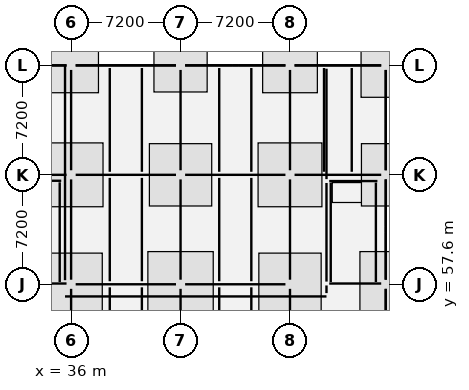
"""IFC4 building model, lengths in metres.
Left out: names, types, materials, properties, quantities, classifications, styles, units other than length and angle.
Written with IfcOpenShell. Run it as: python <this file> out.ifc"""

import sys

from ifc_helpers import new_model, si_unit, direction, frame, frame_2d, origin, origin_2d, place, context, subcontext, project, spatial, rectangle, extrude, element, fill, save


model = new_model("IFC4")
c1 = context("Model", 3, precision=1e-05, world=origin(), true_north=direction((0.0, 1.0)))
c2 = subcontext(c1, "Body", "Model", "MODEL_VIEW")
j1 = project(units=[si_unit("LENGTHUNIT", "METRE"), si_unit("PLANEANGLEUNIT", "RADIAN")], contexts=[c1])
p1 = place(None, origin())
s1 = spatial("IfcSite", under=j1, at=p1, CompositionType="ELEMENT")
p2 = place(p1, origin())
s2 = spatial("IfcBuilding", under=s1, at=p2, CompositionType="ELEMENT")
p3 = place(p2, origin())
s3 = spatial("IfcBuildingStorey", under=s2, at=p3, CompositionType="ELEMENT", Elevation=0.0)
for number, where, z_axis, x_axis in (
    (1, (36.0, 57.6, 0.0), (0.0, 0.0, 1.0), (1.0, 0.0, 0.0)),
    (2, (36.0, 64.8, 0.0), (0.0, 0.0, 1.0), (1.0, 0.0, 0.0)),
    (3, (36.0, 72.0, 0.0), (0.0, 0.0, 1.0), (1.0, 0.0, 0.0)),
    (4, (43.2, 57.6, 0.0), (0.0, 0.0, 1.0), (1.0, 0.0, 0.0)),
    (5, (43.2, 64.8, 0.0), (0.0, 0.0, 1.0), (1.0, 0.0, 0.0)),
    (6, (43.2, 72.0, 0.0), (0.0, 0.0, 1.0), (1.0, 0.0, 0.0)),
    (7, (50.4, 57.6, 0.0), (0.0, 0.0, 1.0), (1.0, 0.0, 0.0)),
    (8, (50.4, 64.8, 0.0), (0.0, 0.0, 1.0), (1.0, 0.0, 0.0)),
    (9, (50.4, 72.0, 0.0), (0.0, 0.0, 1.0), (1.0, 0.0, 0.0)),
    (10, (56.7, 57.6, 0.0), (0.0, 0.0, 1.0), (1.0, 0.0, 0.0)),
    (11, (56.7, 64.8, 0.0), (0.0, 0.0, 1.0), (1.0, 0.0, 0.0)),
    (12, (56.7, 72.0, 0.0), (0.0, 0.0, 1.0), (1.0, 0.0, 0.0)),
):
    element("IfcColumn", number, at=place(p3, frame(where, z_axis=z_axis, x_axis=x_axis)), inside=s3, PredefinedType="COLUMN", context=c2, shape_type="SweptSolid", body=[
        extrude(rectangle(XDim=0.6, YDim=0.6, at=origin_2d()), origin(), (0.0, 0.0, 1.0), 5.4),
    ])
p4 = place(p3, frame((32.16, 57.65, 0.0), z_axis=(0.0, 0.0, 1.0), x_axis=(1.0, 0.0, 0.0)))
e13 = element("IfcWall", 13, at=p4, inside=s3, PredefinedType="SHEAR", context=c2, shape_type="SweptSolid", body=[
    extrude(rectangle(XDim=3.54, YDim=0.2, at=frame_2d((1.77, 0.0))), origin(), (0.0, 0.0, 1.0), 5.15),
])
p5 = place(p4, frame((1.22, 0.0, 0.0)))
e14 = element("IfcOpeningElement", 14, at=p5, cuts=e13, PredefinedType="OPENING", context=c2, shape_type="SweptSolid", body=[
    extrude(rectangle(XDim=1.1, YDim=2.15, at=frame_2d((0.55, 1.075))), frame((0.0, 0.112, 0.0), z_axis=(0.0, -1.0, 0.0), x_axis=(1.0, 0.0, 0.0)), (0.0, 0.0, 1.0), 0.224),
])
p6 = place(p3, frame((32.16, 64.41, 0.0), z_axis=(0.0, 0.0, 1.0), x_axis=(1.0, 0.0, 0.0)))
e15 = element("IfcWall", 15, at=p6, inside=s3, PredefinedType="SHEAR", context=c2, shape_type="SweptSolid", body=[
    extrude(rectangle(XDim=3.19, YDim=0.2, at=frame_2d((1.595, 0.0))), origin(), (0.0, 0.0, 1.0), 5.15),
])
p7 = place(p3, frame((35.25, 57.75, 0.0), z_axis=(0.0, 0.0, 1.0), x_axis=(0.0, 1.0, 0.0)))
e16 = element("IfcWall", 16, at=p7, inside=s3, PredefinedType="SHEAR", context=c2, shape_type="SweptSolid", body=[
    extrude(rectangle(XDim=6.56, YDim=0.2, at=frame_2d((3.28, 0.0))), origin(), (0.0, 0.0, 1.0), 5.15),
])
p8 = place(p3, frame((52.98, 57.65, 0.0), z_axis=(0.0, 0.0, 1.0), x_axis=(1.0, 0.0, 0.0)))
e17 = element("IfcWall", 17, at=p8, inside=s3, PredefinedType="SHEAR", context=c2, shape_type="SweptSolid", body=[
    extrude(rectangle(XDim=3.42, YDim=0.2, at=frame_2d((1.71, 0.0))), origin(), (0.0, 0.0, 1.0), 5.15),
])
p9 = place(p8, frame((1.16, 0.0, 0.0)))
e18 = element("IfcOpeningElement", 18, at=p9, cuts=e17, PredefinedType="OPENING", context=c2, shape_type="SweptSolid", body=[
    extrude(rectangle(XDim=1.1, YDim=2.15, at=frame_2d((0.55, 1.075))), frame((0.0, 0.112, 0.0), z_axis=(0.0, -1.0, 0.0), x_axis=(1.0, 0.0, 0.0)), (0.0, 0.0, 1.0), 0.224),
])
p10 = place(p3, frame((52.98, 64.39, 0.0), z_axis=(0.0, 0.0, 1.0), x_axis=(1.0, 0.0, 0.0)))
e19 = element("IfcWall", 19, at=p10, inside=s3, PredefinedType="SHEAR", context=c2, shape_type="SweptSolid", body=[
    extrude(rectangle(XDim=3.17, YDim=0.2, at=frame_2d((1.585, 0.0))), origin(), (0.0, 0.0, 1.0), 5.15),
])
for number, where, z_axis, x_axis in (
    (20, (53.08, 57.75, 0.0), (0.0, 0.0, 1.0), (0.0, 1.0, 0.0)),
    (21, (56.05, 57.75, 0.0), (0.0, 0.0, 1.0), (0.0, 1.0, 0.0)),
):
    element("IfcWall", number, at=place(p3, frame(where, z_axis=z_axis, x_axis=x_axis)), inside=s3, PredefinedType="SHEAR", context=c2, shape_type="SweptSolid", body=[
        extrude(rectangle(XDim=6.54, YDim=0.2, at=frame_2d((3.27, 0.0))), origin(), (0.0, 0.0, 1.0), 5.15),
    ])
p11 = place(p3, frame((36.3, 72.0, 0.0), z_axis=(0.0, 0.0, 1.0), x_axis=(1.0, 0.0, 0.0)))
e22 = element("IfcWall", 22, at=p11, inside=s3, PredefinedType="ELEMENTEDWALL", context=c2, shape_type="SweptSolid", body=[
    extrude(rectangle(XDim=6.6, YDim=0.32, at=frame_2d((3.3, 0.0))), origin(), (0.0, 0.0, 1.0), 4.49),
])
p12 = place(p11, frame((2.25, 0.0, 0.85)))
e23 = element("IfcOpeningElement", 23, at=p12, cuts=e22, PredefinedType="OPENING", context=c2, shape_type="SweptSolid", body=[
    extrude(rectangle(XDim=2.1, YDim=2.15, at=frame_2d((1.05, 1.075))), frame((0.0, 0.172, 0.0), z_axis=(0.0, -1.0, 0.0), x_axis=(1.0, 0.0, 0.0)), (0.0, 0.0, 1.0), 0.344),
])
p13 = place(p3, frame((46.6, 72.0, 0.0), z_axis=(0.0, 0.0, 1.0), x_axis=(1.0, 0.0, 0.0)))
e24 = element("IfcWall", 24, at=p13, inside=s3, PredefinedType="SOLIDWALL", context=c2, shape_type="SweptSolid", body=[
    extrude(rectangle(XDim=0.4, YDim=0.36, at=frame_2d((0.2, 0.0))), origin(), (0.0, 0.0, 1.0), 4.49),
])
p14 = place(p3, frame((50.7, 72.0, 0.0), z_axis=(0.0, 0.0, 1.0), x_axis=(1.0, 0.0, 0.0)))
e25 = element("IfcWall", 25, at=p14, inside=s3, PredefinedType="ELEMENTEDWALL", context=c2, shape_type="SweptSolid", body=[
    extrude(rectangle(XDim=5.7, YDim=0.32, at=frame_2d((2.85, 0.0))), origin(), (0.0, 0.0, 1.0), 4.49),
])
p15 = place(p3, frame((56.7, 68.6, 0.0), z_axis=(0.0, 0.0, 1.0), x_axis=(0.0, -1.0, 0.0)))
e26 = element("IfcWall", 26, at=p15, inside=s3, PredefinedType="SOLIDWALL", context=c2, shape_type="SweptSolid", body=[
    extrude(rectangle(XDim=0.4, YDim=0.36, at=frame_2d((0.2, 0.0))), origin(), (0.0, 0.0, 1.0), 4.49),
])
p16 = place(p3, frame((56.7, 61.4, 0.0), z_axis=(0.0, 0.0, 1.0), x_axis=(0.0, -1.0, 0.0)))
e27 = element("IfcWall", 27, at=p16, inside=s3, PredefinedType="SOLIDWALL", context=c2, shape_type="SweptSolid", body=[
    extrude(rectangle(XDim=0.4, YDim=0.36, at=frame_2d((0.2, 0.0))), origin(), (0.0, 0.0, 1.0), 4.54),
])
p17 = place(p3, frame((56.7, 57.3, 0.0), z_axis=(0.0, 0.0, 1.0), x_axis=(0.0, -1.0, 0.0)))
e28 = element("IfcWall", 28, at=p17, inside=s3, PredefinedType="ELEMENTEDWALL", context=c2, shape_type="SweptSolid", body=[
    extrude(rectangle(XDim=6.6, YDim=0.32, at=frame_2d((3.3, 0.0))), origin(), (0.0, 0.0, 1.0), 4.49),
])
p18 = place(p17, frame((2.4, 0.0, 0.0)))
e29 = element("IfcOpeningElement", 29, at=p18, cuts=e28, PredefinedType="OPENING", context=c2, shape_type="SweptSolid", body=[
    extrude(rectangle(XDim=1.8, YDim=2.2, at=frame_2d((0.9, 1.1))), frame((0.0, 0.172, 0.0), z_axis=(0.0, -1.0, 0.0), x_axis=(1.0, 0.0, 0.0)), (0.0, 0.0, 1.0), 0.344),
])
p19 = place(p3, frame((35.6, 56.8, 0.0), z_axis=(0.0, 0.0, 1.0), x_axis=(1.0, 0.0, 0.0)))
e30 = element("IfcWall", 30, at=p19, inside=s3, PredefinedType="PARTITIONING", context=c2, shape_type="SweptSolid", body=[
    extrude(rectangle(XDim=17.2, YDim=0.12, at=frame_2d((8.6, 0.0))), origin(), (0.0, 0.0, 1.0), 4.488),
])
p20 = place(p19, frame((8.225, 0.0, 0.0)))
e31 = element("IfcOpeningElement", 31, at=p20, cuts=e30, PredefinedType="OPENING", context=c2, shape_type="SweptSolid", body=[
    extrude(rectangle(XDim=1.25, YDim=2.15, at=frame_2d((0.625, 1.075))), frame((0.0, 0.072, 0.0), z_axis=(0.0, -1.0, 0.0), x_axis=(1.0, 0.0, 0.0)), (0.0, 0.0, 1.0), 0.144),
])
p21 = place(p3, frame((52.8, 57.02, 0.0), z_axis=(0.0, 0.0, 1.0), x_axis=(0.0, 1.0, 0.0)))
e32 = element("IfcWall", 32, at=p21, inside=s3, PredefinedType="PARTITIONING", context=c2, shape_type="SweptSolid", body=[
    extrude(rectangle(XDim=0.504, YDim=0.12, at=frame_2d((0.252, 0.0))), origin(), (0.0, 0.0, 1.0), 5.12),
])
p22 = place(p3, frame((52.8, 57.776, 0.0), z_axis=(0.0, 0.0, 1.0), x_axis=(0.0, 1.0, 0.0)))
e33 = element("IfcWall", 33, at=p22, inside=s3, PredefinedType="PARTITIONING", context=c2, shape_type="SweptSolid", body=[
    extrude(rectangle(XDim=6.488, YDim=0.12, at=frame_2d((3.244, 0.0))), origin(), (0.0, 0.0, 1.0), 5.12),
])
p23 = place(p3, frame((52.8, 64.516, 0.0), z_axis=(0.0, 0.0, 1.0), x_axis=(0.0, 1.0, 0.0)))
e34 = element("IfcWall", 34, at=p23, inside=s3, PredefinedType="PARTITIONING", context=c2, shape_type="SweptSolid", body=[
    extrude(rectangle(XDim=7.264, YDim=0.12, at=frame_2d((3.632, 0.0))), origin(), (0.0, 0.0, 1.0), 4.388),
])
p24 = place(p3, frame((35.6, 57.87, 0.0), z_axis=(0.0, 0.0, 1.0), x_axis=(0.0, 1.0, 0.0)))
e35 = element("IfcWall", 35, at=p24, inside=s3, PredefinedType="PARTITIONING", context=c2, shape_type="SweptSolid", body=[
    extrude(rectangle(XDim=14.13, YDim=0.12, at=frame_2d((7.065, 0.0))), origin(), (0.0, 0.0, 1.0), 4.438),
])
p25 = place(p12, origin())
e36 = element("IfcWindow", 36, at=p25, inside=s3, PartitioningType="SINGLE_PANEL", PredefinedType="WINDOW", context=c2, shape_type="SweptSolid", body=[
    extrude(rectangle(XDim=2.1, YDim=2.15, at=frame_2d((1.05, 1.075))), frame((0.0, 0.03, 0.0), z_axis=(0.0, -1.0, 0.0), x_axis=(1.0, 0.0, 0.0)), (0.0, 0.0, 1.0), 0.06),
])
fill(e23, e36)
p26 = place(p9, frame((1.1, 0.0, 0.0), z_axis=(0.0, 0.0, 1.0), x_axis=(-1.0, 0.0, 0.0)))
e37 = element("IfcDoor", 37, at=p26, inside=s3, OperationType="SINGLE_SWING_RIGHT", PredefinedType="DOOR", context=c2, shape_type="SweptSolid", body=[
    extrude(rectangle(XDim=1.1, YDim=2.15, at=frame_2d((0.55, 1.075))), frame((0.0, 0.025, 0.0), z_axis=(0.0, -1.0, 0.0), x_axis=(1.0, 0.0, 0.0)), (0.0, 0.0, 1.0), 0.05),
])
fill(e18, e37)
p27 = place(p20, origin())
e38 = element("IfcDoor", 38, at=p27, inside=s3, OperationType="SINGLE_SWING_LEFT", PredefinedType="DOOR", context=c2, shape_type="SweptSolid", body=[
    extrude(rectangle(XDim=1.25, YDim=2.15, at=frame_2d((0.625, 1.075))), frame((0.0, 0.025, 0.0), z_axis=(0.0, -1.0, 0.0), x_axis=(1.0, 0.0, 0.0)), (0.0, 0.0, 1.0), 0.05),
])
fill(e31, e38)
save(model, sys.argv[1])
